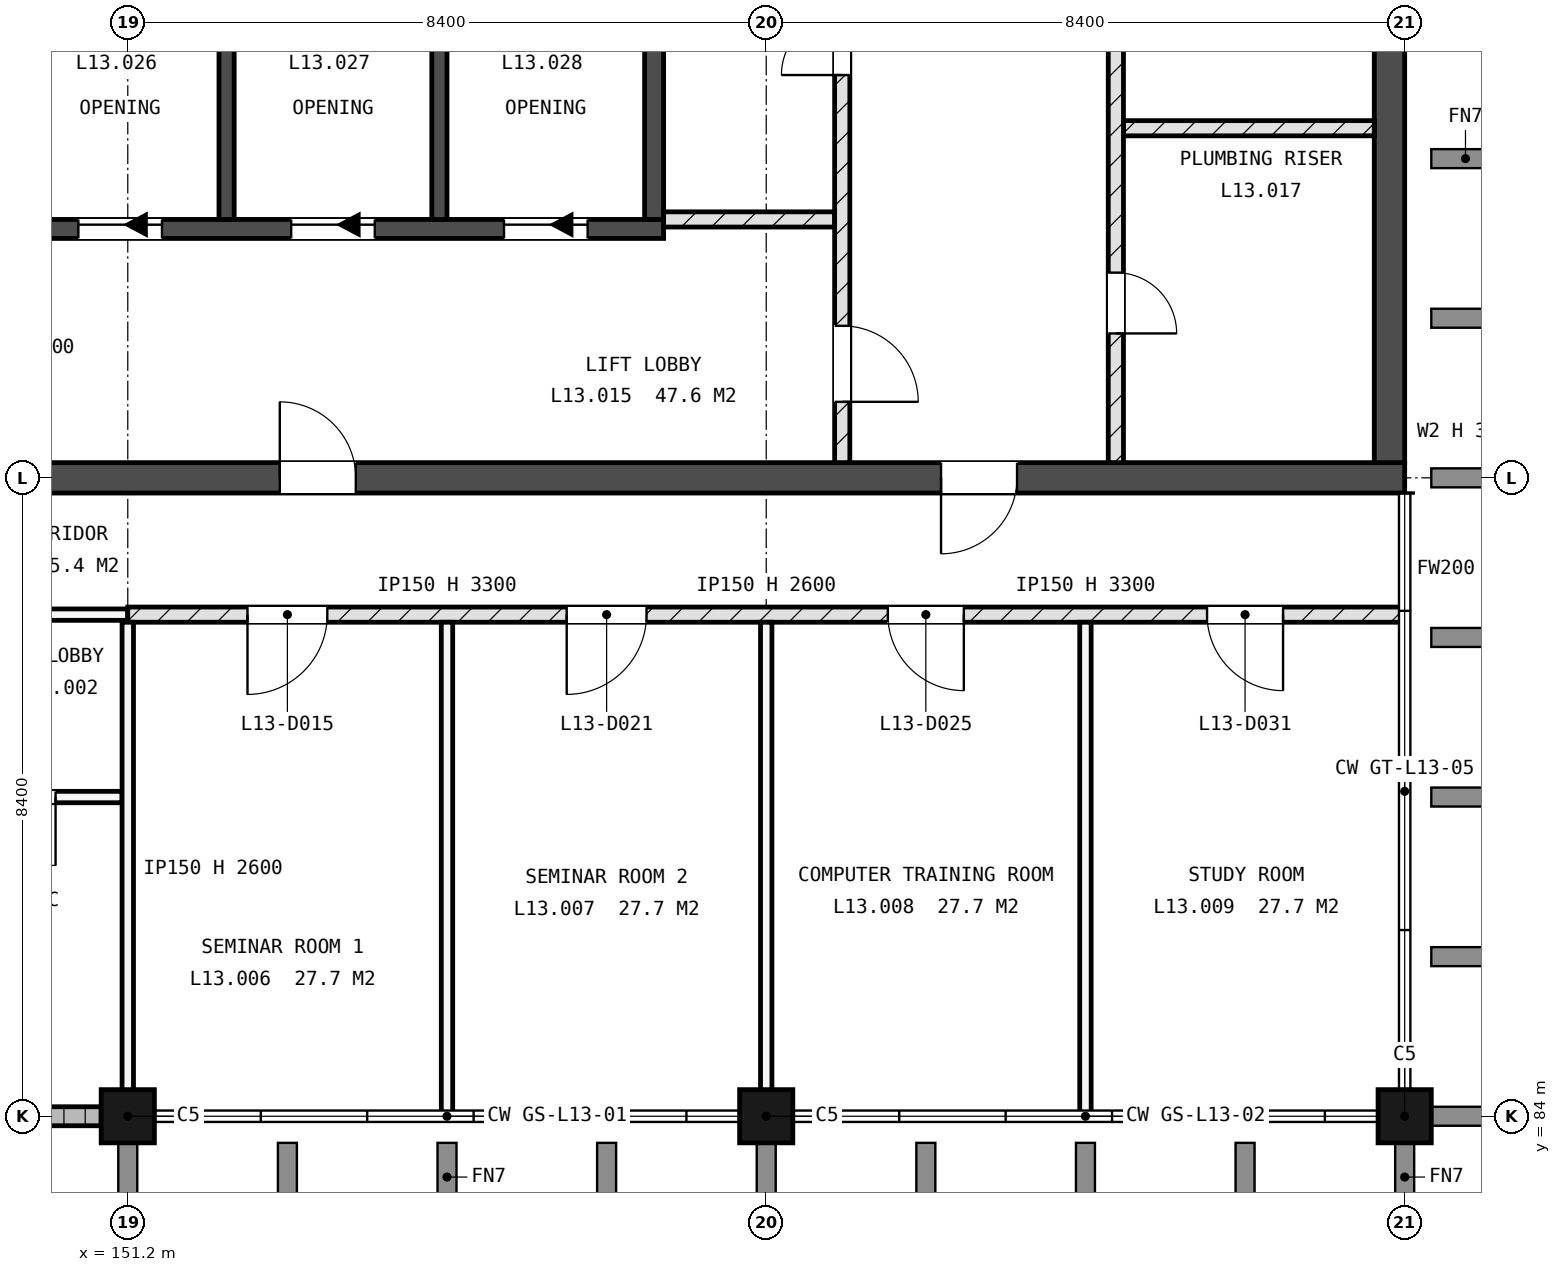
"""IFC4 building model, lengths in metres.
Left out: names, types, materials, properties, quantities, classifications, styles, units other than length and angle.
Written with IfcOpenShell. Run it as: python <this file> out.ifc"""

import sys

from ifc_helpers import new_model, si_unit, direction, frame, frame_2d, origin, origin_2d, place, context, subcontext, project, spatial, rectangle, extrude, element, fill, save


model = new_model("IFC4")
c1 = context("Model", 3, precision=1e-05, world=origin(), true_north=direction((0.0, 1.0)))
c2 = subcontext(c1, "Body", "Model", "MODEL_VIEW")
j1 = project(units=[si_unit("LENGTHUNIT", "METRE"), si_unit("PLANEANGLEUNIT", "RADIAN")], contexts=[c1])
p1 = place(None, origin())
s1 = spatial("IfcSite", under=j1, at=p1, CompositionType="ELEMENT")
p2 = place(p1, origin())
s2 = spatial("IfcBuilding", under=s1, at=p2, CompositionType="ELEMENT")
p3 = place(p2, frame((0.0, 0.0, 50.4)))
s3 = spatial("IfcBuildingStorey", under=s2, at=p3, CompositionType="ELEMENT", Elevation=50.4)
for number, where, z_axis, x_axis in (
    (1, (151.2, 84.0, -0.3), (0.0, 0.0, 1.0), (1.0, 0.0, 0.0)),
    (2, (159.6, 84.0, -0.3), (0.0, 0.0, 1.0), (1.0, 0.0, 0.0)),
    (3, (168.0, 84.0, -0.3), (0.0, 0.0, 1.0), (1.0, 0.0, 0.0)),
):
    element("IfcColumn", number, at=place(p3, frame(where, z_axis=z_axis, x_axis=x_axis)), inside=s3, PredefinedType="COLUMN", context=c2, shape_type="SweptSolid", body=[
        extrude(rectangle(XDim=0.7, YDim=0.7, at=origin_2d()), origin(), (0.0, 0.0, 1.0), 3.6),
    ])
p4 = place(p3, frame((142.8, 92.4, -0.3), z_axis=(0.0, 0.0, 1.0), x_axis=(1.0, 0.0, 0.0)))
e4 = element("IfcWall", 4, at=p4, inside=s3, PredefinedType="SHEAR", context=c2, shape_type="SweptSolid", body=[
    extrude(rectangle(XDim=25.2, YDim=0.4, at=frame_2d((12.6, 0.0))), origin(), (0.0, 0.0, 1.0), 3.6),
])
p5 = place(p4, frame((1.4, 0.0, 0.3)))
e5 = element("IfcOpeningElement", 5, at=p5, cuts=e4, PredefinedType="OPENING", context=c2, shape_type="SweptSolid", body=[
    extrude(rectangle(XDim=1.0, YDim=2.1, at=frame_2d((0.5, 1.05))), frame((0.0, 0.21, 0.0), z_axis=(0.0, -1.0, 0.0), x_axis=(1.0, 0.0, 0.0)), (0.0, 0.0, 1.0), 0.42),
])
p6 = place(p4, frame((19.1, 0.0, 0.3)))
e6 = element("IfcOpeningElement", 6, at=p6, cuts=e4, PredefinedType="OPENING", context=c2, shape_type="SweptSolid", body=[
    extrude(rectangle(XDim=1.0, YDim=2.1, at=frame_2d((0.5, 1.05))), frame((0.0, 0.21, 0.0), z_axis=(0.0, -1.0, 0.0), x_axis=(1.0, 0.0, 0.0)), (0.0, 0.0, 1.0), 0.42),
])
p7 = place(p4, frame((10.4, 0.0, 0.3)))
e7 = element("IfcOpeningElement", 7, at=p7, cuts=e4, PredefinedType="OPENING", context=c2, shape_type="SweptSolid", body=[
    extrude(rectangle(XDim=1.0, YDim=2.1, at=frame_2d((0.5, 1.05))), frame((0.0, 0.21, 0.0), z_axis=(0.0, -1.0, 0.0), x_axis=(1.0, 0.0, 0.0)), (0.0, 0.0, 1.0), 0.42),
])
p8 = place(p3, frame((167.8, 92.6, -0.3), z_axis=(0.0, 0.0, 1.0), x_axis=(0.0, 1.0, 0.0)))
e8 = element("IfcWall", 8, at=p8, inside=s3, PredefinedType="SHEAR", context=c2, shape_type="SweptSolid", body=[
    extrude(rectangle(XDim=16.4, YDim=0.4, at=frame_2d((8.2, 0.0))), origin(), (0.0, 0.0, 1.0), 3.6),
])
p9 = place(p8, frame((12.2, 0.0, 1.9)))
e9 = element("IfcOpeningElement", 9, at=p9, cuts=e8, PredefinedType="OPENING", context=c2, shape_type="SweptSolid", body=[
    extrude(rectangle(XDim=1.2, YDim=0.9, at=frame_2d((0.6, 0.45))), frame((0.0, 0.21, 0.0), z_axis=(0.0, -1.0, 0.0), x_axis=(1.0, 0.0, 0.0)), (0.0, 0.0, 1.0), 0.42),
])
p10 = place(p3, frame((147.0, 95.675, -0.3), z_axis=(0.0, 0.0, 1.0), x_axis=(1.0, 0.0, 0.0)))
e10 = element("IfcWall", 10, at=p10, inside=s3, PredefinedType="SHEAR", context=c2, shape_type="SweptSolid", body=[
    extrude(rectangle(XDim=11.25, YDim=0.25, at=frame_2d((5.625, 0.0))), origin(), (0.0, 0.0, 1.0), 3.6),
])
p11 = place(p10, frame((0.75, 0.0, 0.3)))
e11 = element("IfcOpeningElement", 11, at=p11, cuts=e10, PredefinedType="OPENING", context=c2, shape_type="SweptSolid", body=[
    extrude(rectangle(XDim=1.1, YDim=2.1, at=frame_2d((0.55, 1.05))), frame((0.0, 0.135, 0.0), z_axis=(0.0, -1.0, 0.0), x_axis=(1.0, 0.0, 0.0)), (0.0, 0.0, 1.0), 0.27),
])
p12 = place(p10, frame((3.55, 0.0, 0.3)))
e12 = element("IfcOpeningElement", 12, at=p12, cuts=e10, PredefinedType="OPENING", context=c2, shape_type="SweptSolid", body=[
    extrude(rectangle(XDim=1.1, YDim=2.1, at=frame_2d((0.55, 1.05))), frame((0.0, 0.135, 0.0), z_axis=(0.0, -1.0, 0.0), x_axis=(1.0, 0.0, 0.0)), (0.0, 0.0, 1.0), 0.27),
])
p13 = place(p10, frame((6.35, 0.0, 0.3)))
e13 = element("IfcOpeningElement", 13, at=p13, cuts=e10, PredefinedType="OPENING", context=c2, shape_type="SweptSolid", body=[
    extrude(rectangle(XDim=1.1, YDim=2.1, at=frame_2d((0.55, 1.05))), frame((0.0, 0.135, 0.0), z_axis=(0.0, -1.0, 0.0), x_axis=(1.0, 0.0, 0.0)), (0.0, 0.0, 1.0), 0.27),
])
p14 = place(p10, frame((9.15, 0.0, 0.3)))
e14 = element("IfcOpeningElement", 14, at=p14, cuts=e10, PredefinedType="OPENING", context=c2, shape_type="SweptSolid", body=[
    extrude(rectangle(XDim=1.1, YDim=2.1, at=frame_2d((0.55, 1.05))), frame((0.0, 0.135, 0.0), z_axis=(0.0, -1.0, 0.0), x_axis=(1.0, 0.0, 0.0)), (0.0, 0.0, 1.0), 0.27),
])
p15 = place(p3, frame((158.125, 95.8, -0.3), z_axis=(0.0, 0.0, 1.0), x_axis=(0.0, 1.0, 0.0)))
e15 = element("IfcWall", 15, at=p15, inside=s3, PredefinedType="SHEAR", context=c2, shape_type="SweptSolid", body=[
    extrude(rectangle(XDim=2.9, YDim=0.25, at=frame_2d((1.45, 0.0))), origin(), (0.0, 0.0, 1.0), 3.6),
])
for number, where, z_axis, x_axis in (
    (16, (152.5, 95.8, -0.3), (0.0, 0.0, 1.0), (0.0, 1.0, 0.0)),
    (17, (155.3, 95.8, -0.3), (0.0, 0.0, 1.0), (0.0, 1.0, 0.0)),
):
    element("IfcWall", number, at=place(p3, frame(where, z_axis=z_axis, x_axis=x_axis)), inside=s3, PredefinedType="SHEAR", context=c2, shape_type="SweptSolid", body=[
        extrude(rectangle(XDim=2.9, YDim=0.2, at=frame_2d((1.45, 0.0))), origin(), (0.0, 0.0, 1.0), 3.6),
    ])
p16 = place(p3, frame((143.15, 84.0, 0.0), z_axis=(0.0, 0.0, 1.0), x_axis=(1.0, 0.0, 0.0)))
e18 = element("IfcWall", 18, at=p16, inside=s3, PredefinedType="STANDARD", context=c2, shape_type="SweptSolid", body=[
    extrude(rectangle(XDim=7.7, YDim=0.25, at=frame_2d((3.85, 0.0))), origin(), (0.0, 0.0, 1.0), 2.65),
])
p17 = place(p3, frame((142.925, 88.2, 0.0), z_axis=(0.0, 0.0, 1.0), x_axis=(1.0, 0.0, 0.0)))
e19 = element("IfcWall", 19, at=p17, inside=s3, PredefinedType="PARTITIONING", context=c2, shape_type="SweptSolid", body=[
    extrude(rectangle(XDim=8.2, YDim=0.15, at=frame_2d((4.1, 0.0))), origin(), (0.0, 0.0, 1.0), 3.3),
])
p18 = place(p17, frame((0.825, 0.0, 0.0)))
e20 = element("IfcOpeningElement", 20, at=p18, cuts=e19, PredefinedType="OPENING", context=c2, shape_type="SweptSolid", body=[
    extrude(rectangle(XDim=0.9, YDim=2.1, at=frame_2d((0.45, 1.05))), frame((0.0, 0.085, 0.0), z_axis=(0.0, -1.0, 0.0), x_axis=(1.0, 0.0, 0.0)), (0.0, 0.0, 1.0), 0.17),
])
p19 = place(p17, frame((3.55, 0.0, 0.0)))
e21 = element("IfcOpeningElement", 21, at=p19, cuts=e19, PredefinedType="OPENING", context=c2, shape_type="SweptSolid", body=[
    extrude(rectangle(XDim=1.05, YDim=2.25, at=frame_2d((0.525, 1.125))), frame((0.0, 0.085, 0.0), z_axis=(0.0, -1.0, 0.0), x_axis=(1.0, 0.0, 0.0)), (0.0, 0.0, 1.0), 0.17),
])
p20 = place(p17, frame((6.425, 0.0, 0.0)))
e22 = element("IfcOpeningElement", 22, at=p20, cuts=e19, PredefinedType="OPENING", context=c2, shape_type="SweptSolid", body=[
    extrude(rectangle(XDim=0.9, YDim=2.1, at=frame_2d((0.45, 1.05))), frame((0.0, 0.085, 0.0), z_axis=(0.0, -1.0, 0.0), x_axis=(1.0, 0.0, 0.0)), (0.0, 0.0, 1.0), 0.17),
])
p21 = place(p3, frame((142.925, 90.6, 0.0), z_axis=(0.0, 0.0, 1.0), x_axis=(1.0, 0.0, 0.0)))
e23 = element("IfcWall", 23, at=p21, inside=s3, PredefinedType="PARTITIONING", context=c2, shape_type="SweptSolid", body=[
    extrude(rectangle(XDim=8.275, YDim=0.15, at=frame_2d((4.137, 0.0))), origin(), (0.0, 0.0, 1.0), 3.3),
])
p22 = place(p21, frame((3.575, 0.0, 0.0)))
e24 = element("IfcOpeningElement", 24, at=p22, cuts=e23, PredefinedType="OPENING", context=c2, shape_type="SweptSolid", body=[
    extrude(rectangle(XDim=1.0, YDim=2.1, at=frame_2d((0.5, 1.05))), frame((0.0, 0.085, 0.0), z_axis=(0.0, -1.0, 0.0), x_axis=(1.0, 0.0, 0.0)), (0.0, 0.0, 1.0), 0.17),
])
p23 = place(p3, frame((151.2, 90.6, 0.0), z_axis=(0.0, 0.0, 1.0), x_axis=(1.0, 0.0, 0.0)))
e25 = element("IfcWall", 25, at=p23, inside=s3, PredefinedType="SOLIDWALL", context=c2, shape_type="SweptSolid", body=[
    extrude(rectangle(XDim=16.8, YDim=0.2, at=frame_2d((8.4, 0.0))), origin(), (0.0, 0.0, 1.0), 3.3),
])
p24 = place(p23, frame((1.575, 0.0, 0.0)))
e26 = element("IfcOpeningElement", 26, at=p24, cuts=e25, PredefinedType="OPENING", context=c2, shape_type="SweptSolid", body=[
    extrude(rectangle(XDim=1.05, YDim=2.1, at=frame_2d((0.525, 1.05))), frame((0.0, 0.11, 0.0), z_axis=(0.0, -1.0, 0.0), x_axis=(1.0, 0.0, 0.0)), (0.0, 0.0, 1.0), 0.22),
])
p25 = place(p23, frame((5.775, 0.0, 0.0)))
e27 = element("IfcOpeningElement", 27, at=p25, cuts=e25, PredefinedType="OPENING", context=c2, shape_type="SweptSolid", body=[
    extrude(rectangle(XDim=1.05, YDim=2.1, at=frame_2d((0.525, 1.05))), frame((0.0, 0.11, 0.0), z_axis=(0.0, -1.0, 0.0), x_axis=(1.0, 0.0, 0.0)), (0.0, 0.0, 1.0), 0.22),
])
p26 = place(p23, frame((10.0, 0.0, 0.0)))
e28 = element("IfcOpeningElement", 28, at=p26, cuts=e25, PredefinedType="OPENING", context=c2, shape_type="SweptSolid", body=[
    extrude(rectangle(XDim=1.0, YDim=2.1, at=frame_2d((0.5, 1.05))), frame((0.0, 0.11, 0.0), z_axis=(0.0, -1.0, 0.0), x_axis=(1.0, 0.0, 0.0)), (0.0, 0.0, 1.0), 0.22),
])
p27 = place(p23, frame((14.2, 0.0, 0.0)))
e29 = element("IfcOpeningElement", 29, at=p27, cuts=e25, PredefinedType="OPENING", context=c2, shape_type="SweptSolid", body=[
    extrude(rectangle(XDim=1.0, YDim=2.1, at=frame_2d((0.5, 1.05))), frame((0.0, 0.11, 0.0), z_axis=(0.0, -1.0, 0.0), x_axis=(1.0, 0.0, 0.0)), (0.0, 0.0, 1.0), 0.22),
])
p28 = place(p3, frame((158.25, 95.8, 0.0), z_axis=(0.0, 0.0, 1.0), x_axis=(1.0, 0.0, 0.0)))
e30 = element("IfcWall", 30, at=p28, inside=s3, PredefinedType="SOLIDWALL", context=c2, shape_type="SweptSolid", body=[
    extrude(rectangle(XDim=2.25, YDim=0.2, at=frame_2d((1.125, 0.0))), origin(), (0.0, 0.0, 1.0), 3.3),
])
p29 = place(p3, frame((164.3, 97.0, 0.0), z_axis=(0.0, 0.0, 1.0), x_axis=(1.0, 0.0, 0.0)))
e31 = element("IfcWall", 31, at=p29, inside=s3, PredefinedType="SOLIDWALL", context=c2, shape_type="SweptSolid", body=[
    extrude(rectangle(XDim=3.3, YDim=0.2, at=frame_2d((1.65, 0.0))), origin(), (0.0, 0.0, 1.0), 3.3),
])
p30 = place(p3, frame((151.2, 84.0, 0.0), z_axis=(0.0, 0.0, 1.0), x_axis=(0.0, 1.0, 0.0)))
e32 = element("IfcWall", 32, at=p30, inside=s3, PredefinedType="PARTITIONING", context=c2, shape_type="SweptSolid", body=[
    extrude(rectangle(XDim=6.5, YDim=0.15, at=frame_2d((3.25, 0.0))), origin(), (0.0, 0.0, 1.0), 2.6),
])
p31 = place(p3, frame((155.4, 84.0, 0.0), z_axis=(0.0, 0.0, 1.0), x_axis=(0.0, 1.0, 0.0)))
e33 = element("IfcWall", 33, at=p31, inside=s3, PredefinedType="PARTITIONING", context=c2, shape_type="SweptSolid", body=[
    extrude(rectangle(XDim=6.5, YDim=0.15, at=frame_2d((3.25, 0.0))), origin(), (0.0, 0.0, 1.0), 3.3),
])
p32 = place(p3, frame((159.6, 84.0, 0.0), z_axis=(0.0, 0.0, 1.0), x_axis=(0.0, 1.0, 0.0)))
e34 = element("IfcWall", 34, at=p32, inside=s3, PredefinedType="PARTITIONING", context=c2, shape_type="SweptSolid", body=[
    extrude(rectangle(XDim=6.5, YDim=0.15, at=frame_2d((3.25, 0.0))), origin(), (0.0, 0.0, 1.0), 2.6),
])
p33 = place(p3, frame((160.6, 92.6, 0.0), z_axis=(0.0, 0.0, 1.0), x_axis=(0.0, 1.0, 0.0)))
e35 = element("IfcWall", 35, at=p33, inside=s3, PredefinedType="SOLIDWALL", context=c2, shape_type="SweptSolid", body=[
    extrude(rectangle(XDim=12.5, YDim=0.2, at=frame_2d((6.25, 0.0))), origin(), (0.0, 0.0, 1.0), 3.3),
])
p34 = place(p33, frame((5.1, 0.0, 0.0)))
e36 = element("IfcOpeningElement", 36, at=p34, cuts=e35, PredefinedType="OPENING", context=c2, shape_type="SweptSolid", body=[
    extrude(rectangle(XDim=0.8, YDim=2.1, at=frame_2d((0.4, 1.05))), frame((0.0, 0.11, 0.0), z_axis=(0.0, -1.0, 0.0), x_axis=(1.0, 0.0, 0.0)), (0.0, 0.0, 1.0), 0.22),
])
p35 = place(p33, frame((0.8, 0.0, 0.0)))
e37 = element("IfcOpeningElement", 37, at=p35, cuts=e35, PredefinedType="OPENING", context=c2, shape_type="SweptSolid", body=[
    extrude(rectangle(XDim=1.0, YDim=2.1, at=frame_2d((0.5, 1.05))), frame((0.0, 0.11, 0.0), z_axis=(0.0, -1.0, 0.0), x_axis=(1.0, 0.0, 0.0)), (0.0, 0.0, 1.0), 0.22),
])
p36 = place(p3, frame((163.8, 84.0, 0.0), z_axis=(0.0, 0.0, 1.0), x_axis=(0.0, 1.0, 0.0)))
e38 = element("IfcWall", 38, at=p36, inside=s3, PredefinedType="PARTITIONING", context=c2, shape_type="SweptSolid", body=[
    extrude(rectangle(XDim=6.5, YDim=0.15, at=frame_2d((3.25, 0.0))), origin(), (0.0, 0.0, 1.0), 3.3),
])
p37 = place(p3, frame((164.2, 92.6, 0.0), z_axis=(0.0, 0.0, 1.0), x_axis=(0.0, 1.0, 0.0)))
e39 = element("IfcWall", 39, at=p37, inside=s3, PredefinedType="SOLIDWALL", context=c2, shape_type="SweptSolid", body=[
    extrude(rectangle(XDim=8.75, YDim=0.2, at=frame_2d((4.375, 0.0))), origin(), (0.0, 0.0, 1.0), 3.3),
])
p38 = place(p37, frame((1.7, 0.0, 0.0)))
e40 = element("IfcOpeningElement", 40, at=p38, cuts=e39, PredefinedType="OPENING", context=c2, shape_type="SweptSolid", body=[
    extrude(rectangle(XDim=0.8, YDim=2.1, at=frame_2d((0.4, 1.05))), frame((0.0, 0.11, 0.0), z_axis=(0.0, -1.0, 0.0), x_axis=(1.0, 0.0, 0.0)), (0.0, 0.0, 1.0), 0.22),
])
p39 = place(p37, frame((6.3, 0.0, 0.0)))
e41 = element("IfcOpeningElement", 41, at=p39, cuts=e39, PredefinedType="OPENING", context=c2, shape_type="SweptSolid", body=[
    extrude(rectangle(XDim=0.8, YDim=2.1, at=frame_2d((0.4, 1.05))), frame((0.0, 0.11, 0.0), z_axis=(0.0, -1.0, 0.0), x_axis=(1.0, 0.0, 0.0)), (0.0, 0.0, 1.0), 0.22),
])
p40 = place(p12, origin())
e42 = element("IfcDoor", 42, at=p40, inside=s3, OperationType="SLIDING_TO_LEFT", PredefinedType="DOOR", context=c2, shape_type="SweptSolid", body=[
    extrude(rectangle(XDim=1.1, YDim=2.1, at=frame_2d((0.55, 1.05))), frame((0.0, 0.025, 0.0), z_axis=(0.0, -1.0, 0.0), x_axis=(1.0, 0.0, 0.0)), (0.0, 0.0, 1.0), 0.05),
])
fill(e12, e42)
p41 = place(p13, origin())
e43 = element("IfcDoor", 43, at=p41, inside=s3, OperationType="SLIDING_TO_LEFT", PredefinedType="DOOR", context=c2, shape_type="SweptSolid", body=[
    extrude(rectangle(XDim=1.1, YDim=2.1, at=frame_2d((0.55, 1.05))), frame((0.0, 0.025, 0.0), z_axis=(0.0, -1.0, 0.0), x_axis=(1.0, 0.0, 0.0)), (0.0, 0.0, 1.0), 0.05),
])
fill(e13, e43)
p42 = place(p14, origin())
e44 = element("IfcDoor", 44, at=p42, inside=s3, OperationType="SLIDING_TO_LEFT", PredefinedType="DOOR", context=c2, shape_type="SweptSolid", body=[
    extrude(rectangle(XDim=1.1, YDim=2.1, at=frame_2d((0.55, 1.05))), frame((0.0, 0.025, 0.0), z_axis=(0.0, -1.0, 0.0), x_axis=(1.0, 0.0, 0.0)), (0.0, 0.0, 1.0), 0.05),
])
fill(e14, e44)
p43 = place(p20, origin())
e45 = element("IfcDoor", 45, at=p43, inside=s3, OperationType="SINGLE_SWING_RIGHT", PredefinedType="DOOR", context=c2, shape_type="SweptSolid", body=[
    extrude(rectangle(XDim=0.9, YDim=2.1, at=frame_2d((0.45, 1.05))), frame((0.0, 0.025, 0.0), z_axis=(0.0, -1.0, 0.0), x_axis=(1.0, 0.0, 0.0)), (0.0, 0.0, 1.0), 0.05),
])
fill(e22, e45)
p44 = place(p24, origin())
e46 = element("IfcDoor", 46, at=p44, inside=s3, OperationType="SINGLE_SWING_LEFT", PredefinedType="DOOR", context=c2, shape_type="SweptSolid", body=[
    extrude(rectangle(XDim=1.05, YDim=2.1, at=frame_2d((0.525, 1.05))), frame((0.0, 0.025, 0.0), z_axis=(0.0, -1.0, 0.0), x_axis=(1.0, 0.0, 0.0)), (0.0, 0.0, 1.0), 0.05),
])
fill(e26, e46)
p45 = place(p25, origin())
e47 = element("IfcDoor", 47, at=p45, inside=s3, OperationType="SINGLE_SWING_LEFT", PredefinedType="DOOR", context=c2, shape_type="SweptSolid", body=[
    extrude(rectangle(XDim=1.05, YDim=2.1, at=frame_2d((0.525, 1.05))), frame((0.0, 0.025, 0.0), z_axis=(0.0, -1.0, 0.0), x_axis=(1.0, 0.0, 0.0)), (0.0, 0.0, 1.0), 0.05),
])
fill(e27, e47)
p46 = place(p26, origin())
e48 = element("IfcDoor", 48, at=p46, inside=s3, OperationType="SINGLE_SWING_RIGHT", PredefinedType="DOOR", context=c2, shape_type="SweptSolid", body=[
    extrude(rectangle(XDim=1.0, YDim=2.1, at=frame_2d((0.5, 1.05))), frame((0.0, 0.025, 0.0), z_axis=(0.0, -1.0, 0.0), x_axis=(1.0, 0.0, 0.0)), (0.0, 0.0, 1.0), 0.05),
])
fill(e28, e48)
p47 = place(p27, origin())
e49 = element("IfcDoor", 49, at=p47, inside=s3, OperationType="SINGLE_SWING_RIGHT", PredefinedType="DOOR", context=c2, shape_type="SweptSolid", body=[
    extrude(rectangle(XDim=1.0, YDim=2.1, at=frame_2d((0.5, 1.05))), frame((0.0, 0.025, 0.0), z_axis=(0.0, -1.0, 0.0), x_axis=(1.0, 0.0, 0.0)), (0.0, 0.0, 1.0), 0.05),
])
fill(e29, e49)
p48 = place(p38, origin())
e50 = element("IfcDoor", 50, at=p48, inside=s3, OperationType="SINGLE_SWING_LEFT", PredefinedType="DOOR", context=c2, shape_type="SweptSolid", body=[
    extrude(rectangle(XDim=0.8, YDim=2.1, at=frame_2d((0.4, 1.05))), frame((0.0, 0.025, 0.0), z_axis=(0.0, -1.0, 0.0), x_axis=(1.0, 0.0, 0.0)), (0.0, 0.0, 1.0), 0.05),
])
fill(e40, e50)
p49 = place(p34, origin())
e51 = element("IfcDoor", 51, at=p49, inside=s3, OperationType="SINGLE_SWING_RIGHT", PredefinedType="DOOR", context=c2, shape_type="SweptSolid", body=[
    extrude(rectangle(XDim=0.8, YDim=2.1, at=frame_2d((0.4, 1.05))), frame((0.0, 0.025, 0.0), z_axis=(0.0, -1.0, 0.0), x_axis=(1.0, 0.0, 0.0)), (0.0, 0.0, 1.0), 0.05),
])
fill(e36, e51)
p50 = place(p6, origin())
e52 = element("IfcDoor", 52, at=p50, inside=s3, OperationType="SINGLE_SWING_LEFT", PredefinedType="DOOR", context=c2, shape_type="SweptSolid", body=[
    extrude(rectangle(XDim=1.0, YDim=2.1, at=frame_2d((0.5, 1.05))), frame((0.0, 0.025, 0.0), z_axis=(0.0, -1.0, 0.0), x_axis=(1.0, 0.0, 0.0)), (0.0, 0.0, 1.0), 0.05),
])
fill(e6, e52)
p51 = place(p7, origin())
e53 = element("IfcDoor", 53, at=p51, inside=s3, OperationType="SINGLE_SWING_RIGHT", PredefinedType="DOOR", context=c2, shape_type="SweptSolid", body=[
    extrude(rectangle(XDim=1.0, YDim=2.1, at=frame_2d((0.5, 1.05))), frame((0.0, 0.025, 0.0), z_axis=(0.0, -1.0, 0.0), x_axis=(1.0, 0.0, 0.0)), (0.0, 0.0, 1.0), 0.05),
])
fill(e7, e53)
p52 = place(p35, origin())
e54 = element("IfcDoor", 54, at=p52, inside=s3, OperationType="SINGLE_SWING_LEFT", PredefinedType="DOOR", context=c2, shape_type="SweptSolid", body=[
    extrude(rectangle(XDim=1.0, YDim=2.1, at=frame_2d((0.5, 1.05))), frame((0.0, 0.025, 0.0), z_axis=(0.0, -1.0, 0.0), x_axis=(1.0, 0.0, 0.0)), (0.0, 0.0, 1.0), 0.05),
])
fill(e37, e54)
save(model, sys.argv[1])
